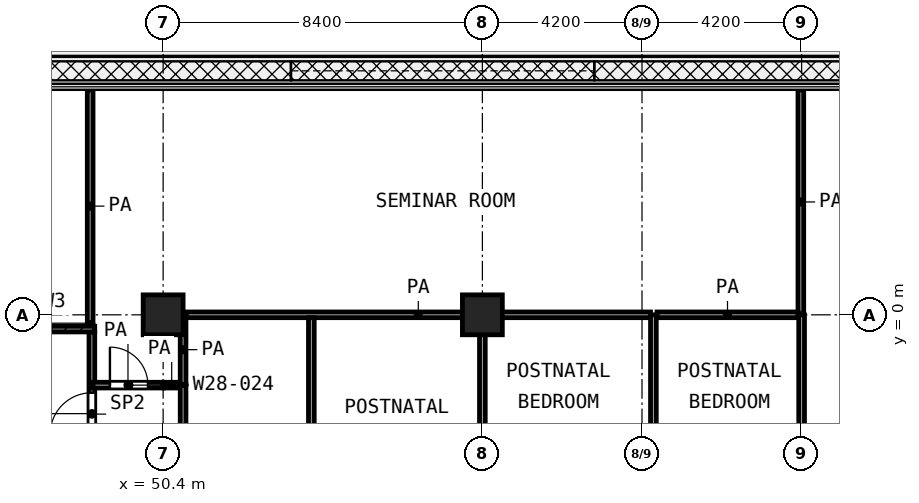
"""IFC4 building model, lengths in metres.
Left out: names, types, materials, properties, quantities, classifications, styles, units other than length and angle.
Written with IfcOpenShell. Run it as: python <this file> out.ifc"""

import sys

from ifc_helpers import new_model, si_unit, direction, frame, frame_2d, origin, origin_2d, place, context, subcontext, project, spatial, rectangle, extrude, element, fill, save


model = new_model("IFC4")
c1 = context("Model", 3, precision=1e-05, world=origin(), true_north=direction((0.0, 1.0)))
c2 = subcontext(c1, "Body", "Model", "MODEL_VIEW")
j1 = project(units=[si_unit("LENGTHUNIT", "METRE"), si_unit("PLANEANGLEUNIT", "RADIAN")], contexts=[c1])
p1 = place(None, origin())
s1 = spatial("IfcSite", under=j1, at=p1, CompositionType="ELEMENT")
p2 = place(p1, origin())
s2 = spatial("IfcBuilding", under=s1, at=p2, CompositionType="ELEMENT")
p3 = place(p2, frame((0.0, 0.0, 145.0)))
s3 = spatial("IfcBuildingStorey", under=s2, at=p3, CompositionType="ELEMENT", Elevation=145.0)
for number, where, z_axis, x_axis in (
    (1, (50.4, 0.0, 0.0), (0.0, 0.0, 1.0), (1.0, 0.0, 0.0)),
    (2, (58.8, 0.0, 0.0), (0.0, 0.0, 1.0), (1.0, 0.0, 0.0)),
):
    element("IfcColumn", number, at=place(p3, frame(where, z_axis=z_axis, x_axis=x_axis)), inside=s3, PredefinedType="COLUMN", context=c2, shape_type="SweptSolid", body=[
        extrude(rectangle(XDim=1.05, YDim=1.05, at=origin_2d()), origin(), (0.0, 0.0, 1.0), 4.2),
    ])
p4 = place(p3, frame((46.15, -0.375, 0.0), z_axis=(0.0, 0.0, 1.0), x_axis=(1.0, 0.0, 0.0)))
e3 = element("IfcWall", 3, at=p4, inside=s3, PredefinedType="SHEAR", context=c2, shape_type="SweptSolid", body=[
    extrude(rectangle(XDim=2.45, YDim=0.15, at=frame_2d((1.225, 0.0))), origin(), (0.0, 0.0, 1.0), 3.6),
])
p5 = place(p3, frame((48.525, -4.775, 0.0), z_axis=(0.0, 0.0, 1.0), x_axis=(0.0, 1.0, 0.0)))
e4 = element("IfcWall", 4, at=p5, inside=s3, PredefinedType="PARTITIONING", context=c2, shape_type="SweptSolid", body=[
    extrude(rectangle(XDim=4.325, YDim=0.15, at=frame_2d((2.163, 0.0))), origin(), (0.0, 0.0, 1.0), 3.6),
])
p6 = place(p5, frame((1.625, 0.0, 0.0)))
e5 = element("IfcOpeningElement", 5, at=p6, cuts=e4, PredefinedType="OPENING", context=c2, shape_type="SweptSolid", body=[
    extrude(rectangle(XDim=1.1, YDim=2.1, at=frame_2d((0.55, 1.05))), frame((0.0, 0.085, 0.0), z_axis=(0.0, -1.0, 0.0), x_axis=(1.0, 0.0, 0.0)), (0.0, 0.0, 1.0), 0.17),
])
p7 = place(p3, frame((48.55, -1.85, 0.0), z_axis=(0.0, 0.0, 1.0), x_axis=(1.0, 0.0, 0.0)))
e6 = element("IfcWall", 6, at=p7, inside=s3, PredefinedType="PARTITIONING", context=c2, shape_type="SweptSolid", body=[
    extrude(rectangle(XDim=1.85, YDim=0.15, at=frame_2d((0.925, 0.0))), origin(), (0.0, 0.0, 1.0), 3.6),
])
p8 = place(p7, frame((0.45, 0.0, 0.0)))
e7 = element("IfcOpeningElement", 7, at=p8, cuts=e6, PredefinedType="OPENING", context=c2, shape_type="SweptSolid", body=[
    extrude(rectangle(XDim=1.0, YDim=2.1, at=frame_2d((0.5, 1.05))), frame((0.0, 0.085, 0.0), z_axis=(0.0, -1.0, 0.0), x_axis=(1.0, 0.0, 0.0)), (0.0, 0.0, 1.0), 0.17),
])
p9 = place(p3, frame((50.42, -1.85, 0.0), z_axis=(0.0, 0.0, 1.0), x_axis=(1.0, 0.0, 0.0)))
e8 = element("IfcWall", 8, at=p9, inside=s3, PredefinedType="PARTITIONING", context=c2, shape_type="SweptSolid", body=[
    extrude(rectangle(XDim=0.41, YDim=0.15, at=frame_2d((0.205, 0.0))), origin(), (0.0, 0.0, 1.0), 3.6),
])
p10 = place(p3, frame((51.003, 0.0, 0.0), z_axis=(0.0, 0.0, 1.0), x_axis=(1.0, 0.0, 0.0)))
e9 = element("IfcWall", 9, at=p10, inside=s3, PredefinedType="PARTITIONING", context=c2, shape_type="SweptSolid", body=[
    extrude(rectangle(XDim=12.222, YDim=0.15, at=frame_2d((6.111, 0.0))), origin(), (0.0, 0.0, 1.0), 3.6),
])
p11 = place(p3, frame((63.395, 0.0, 0.0), z_axis=(0.0, 0.0, 1.0), x_axis=(1.0, 0.0, 0.0)))
e10 = element("IfcWall", 10, at=p11, inside=s3, PredefinedType="PARTITIONING", context=c2, shape_type="SweptSolid", body=[
    extrude(rectangle(XDim=3.71, YDim=0.15, at=frame_2d((1.855, 0.0))), origin(), (0.0, 0.0, 1.0), 3.6),
])
p12 = place(p3, frame((48.48, -0.2, 0.0), z_axis=(0.0, 0.0, 1.0), x_axis=(0.0, 1.0, 0.0)))
e11 = element("IfcWall", 11, at=p12, inside=s3, PredefinedType="PARTITIONING", context=c2, shape_type="SweptSolid", body=[
    extrude(rectangle(XDim=6.12, YDim=0.15, at=frame_2d((3.06, 0.0))), origin(), (0.0, 0.0, 1.0), 3.6),
])
p13 = place(p3, frame((50.925, -8.4, 0.0), z_axis=(0.0, 0.0, 1.0), x_axis=(0.0, 1.0, 0.0)))
e12 = element("IfcWall", 12, at=p13, inside=s3, PredefinedType="PARTITIONING", context=c2, shape_type="SweptSolid", body=[
    extrude(rectangle(XDim=6.55, YDim=0.15, at=frame_2d((3.275, 0.0))), origin(), (0.0, 0.0, 1.0), 3.6),
])
p14 = place(p13, frame((2.775, 0.0, 0.0)))
e13 = element("IfcOpeningElement", 13, at=p14, cuts=e12, PredefinedType="OPENING", context=c2, shape_type="SweptSolid", body=[
    extrude(rectangle(XDim=1.0, YDim=2.1, at=frame_2d((0.5, 1.05))), frame((0.0, 0.085, 0.0), z_axis=(0.0, -1.0, 0.0), x_axis=(1.0, 0.0, 0.0)), (0.0, 0.0, 1.0), 0.17),
])
p15 = place(p3, frame((50.925, -1.83, 0.0), z_axis=(0.0, 0.0, 1.0), x_axis=(0.0, 1.0, 0.0)))
e14 = element("IfcWall", 14, at=p15, inside=s3, PredefinedType="PARTITIONING", context=c2, shape_type="SweptSolid", body=[
    extrude(rectangle(XDim=1.827, YDim=0.15, at=frame_2d((0.914, 0.0))), origin(), (0.0, 0.0, 1.0), 3.6),
])
for number, where, z_axis, x_axis in (
    (15, (54.3, -8.325, 0.0), (0.0, 0.0, 1.0), (0.0, 1.0, 0.0)),
    (16, (58.8, -8.325, 0.0), (0.0, 0.0, 1.0), (0.0, 1.0, 0.0)),
):
    element("IfcWall", number, at=place(p3, frame(where, z_axis=z_axis, x_axis=x_axis)), inside=s3, PredefinedType="PARTITIONING", context=c2, shape_type="SweptSolid", body=[
        extrude(rectangle(XDim=8.25, YDim=0.15, at=frame_2d((4.125, 0.0))), origin(), (0.0, 0.0, 1.0), 3.6),
    ])
p16 = place(p3, frame((63.3, -8.325, 0.0), z_axis=(0.0, 0.0, 1.0), x_axis=(0.0, 1.0, 0.0)))
e17 = element("IfcWall", 17, at=p16, inside=s3, PredefinedType="PARTITIONING", context=c2, shape_type="SweptSolid", body=[
    extrude(rectangle(XDim=8.325, YDim=0.15, at=frame_2d((4.163, 0.0))), origin(), (0.0, 0.0, 1.0), 3.6),
])
p17 = place(p3, frame((67.18, 0.02, 0.0), z_axis=(0.0, 0.0, 1.0), x_axis=(0.0, 1.0, 0.0)))
e18 = element("IfcWall", 18, at=p17, inside=s3, PredefinedType="PARTITIONING", context=c2, shape_type="SweptSolid", body=[
    extrude(rectangle(XDim=5.9, YDim=0.15, at=frame_2d((2.95, 0.0))), origin(), (0.0, 0.0, 1.0), 3.6),
])
p18 = place(p3, frame((67.2, -8.325, 0.0), z_axis=(0.0, 0.0, 1.0), x_axis=(0.0, 1.0, 0.0)))
e19 = element("IfcWall", 19, at=p18, inside=s3, PredefinedType="PARTITIONING", context=c2, shape_type="SweptSolid", body=[
    extrude(rectangle(XDim=8.323, YDim=0.15, at=frame_2d((4.162, 0.0))), origin(), (0.0, 0.0, 1.0), 3.6),
])
p19 = place(p6, origin())
e20 = element("IfcDoor", 20, at=p19, inside=s3, OperationType="SINGLE_SWING_LEFT", PredefinedType="DOOR", context=c2, shape_type="SweptSolid", body=[
    extrude(rectangle(XDim=1.1, YDim=2.1, at=frame_2d((0.55, 1.05))), frame((0.0, 0.025, 0.0), z_axis=(0.0, -1.0, 0.0), x_axis=(1.0, 0.0, 0.0)), (0.0, 0.0, 1.0), 0.05),
])
fill(e5, e20)
p20 = place(p8, origin())
e21 = element("IfcDoor", 21, at=p20, inside=s3, OperationType="SINGLE_SWING_LEFT", PredefinedType="DOOR", context=c2, shape_type="SweptSolid", body=[
    extrude(rectangle(XDim=1.0, YDim=2.1, at=frame_2d((0.5, 1.05))), frame((0.0, 0.025, 0.0), z_axis=(0.0, -1.0, 0.0), x_axis=(1.0, 0.0, 0.0)), (0.0, 0.0, 1.0), 0.05),
])
fill(e7, e21)
save(model, sys.argv[1])
